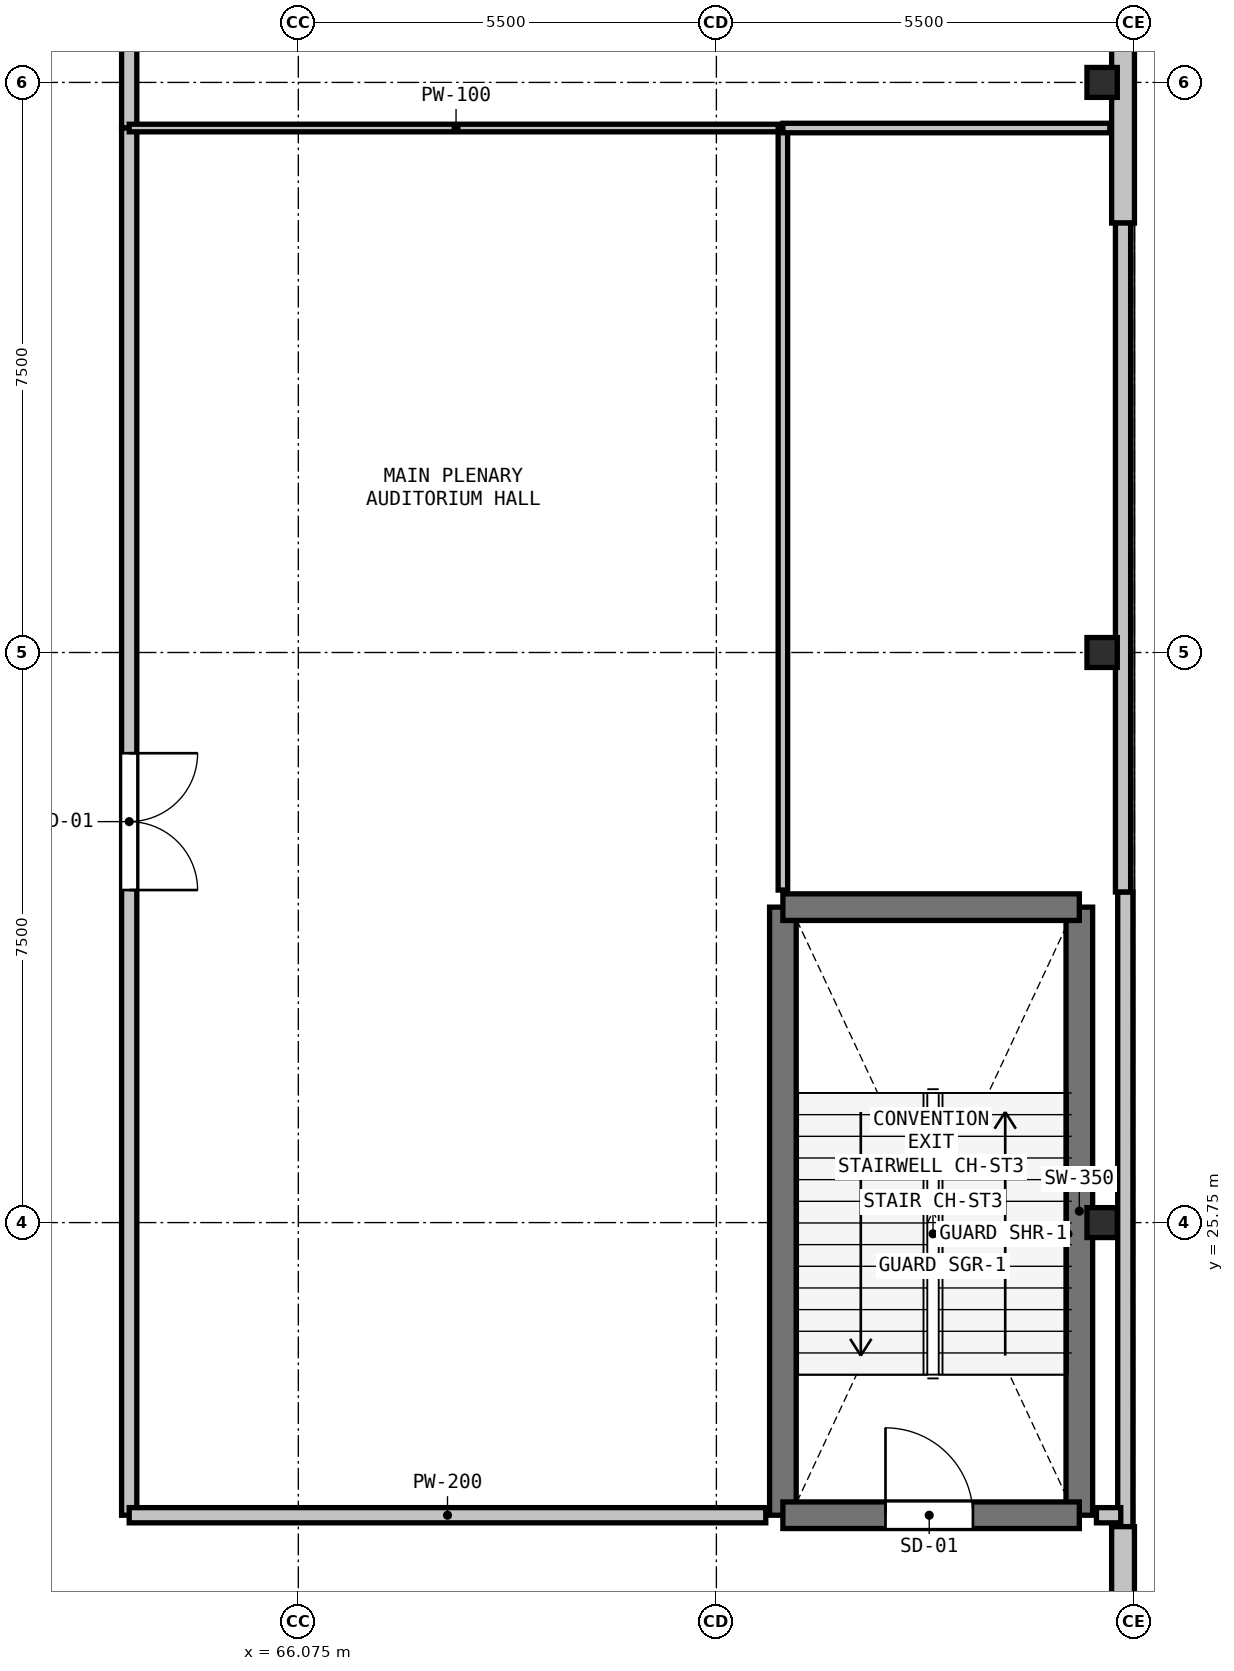
"""IFC4 building model, lengths in metres.
Left out: names, types, materials, properties, quantities, classifications, styles, units other than length and angle.
Written with IfcOpenShell. Run it as: python <this file> out.ifc"""

import sys

from ifc_helpers import new_model, si_unit, direction, frame, frame_2d, origin, origin_2d, place, context, subcontext, project, spatial, rectangle, i_section, extrude, element, fill, save


model = new_model("IFC4")
c1 = context("Model", 3, precision=1e-05, world=origin(), true_north=direction((0.0, 1.0)))
c2 = subcontext(c1, "Body", "Model", "MODEL_VIEW")
j1 = project(units=[si_unit("LENGTHUNIT", "METRE"), si_unit("PLANEANGLEUNIT", "RADIAN")], contexts=[c1])
p1 = place(None, origin())
s1 = spatial("IfcSite", under=j1, at=p1, CompositionType="ELEMENT")
p2 = place(p1, origin())
s2 = spatial("IfcBuilding", under=s1, at=p2, CompositionType="ELEMENT")
p3 = place(p2, frame((0.0, 0.0, 9.6)))
s3 = spatial("IfcBuildingStorey", under=s2, at=p3, CompositionType="ELEMENT", Elevation=9.6)
for number, where, z_axis, x_axis in (
    (1, (76.65, 25.75, 0.0), (0.0, 0.0, 1.0), (1.0, 0.0, 0.0)),
    (2, (76.65, 33.25, 0.0), (0.0, 0.0, 1.0), (1.0, 0.0, 0.0)),
    (3, (76.65, 40.75, 0.0), (0.0, 0.0, 1.0), (1.0, 0.0, 0.0)),
):
    element("IfcColumn", number, at=place(p3, frame(where, z_axis=z_axis, x_axis=x_axis)), inside=s3, PredefinedType="COLUMN", context=c2, shape_type="SweptSolid", body=[
        extrude(i_section(OverallWidth=0.399, OverallDepth=0.394, WebThickness=0.023, FlangeThickness=0.037, at=origin_2d()), origin(), (0.0, 0.0, 1.0), 4.8),
    ])
p4 = place(p3, frame((76.955, 30.1, 0.0), z_axis=(0.0, 0.0, 1.0), x_axis=(0.0, -1.0, 0.0)))
e4 = element("IfcWall", 4, at=p4, inside=s3, PredefinedType="PARAPET", context=c2, shape_type="SweptSolid", body=[
    extrude(rectangle(XDim=8.35, YDim=0.2, at=frame_2d((4.175, 0.0))), origin(), (0.0, 0.0, 1.0), 4.09),
])
p5 = place(p3, frame((76.925, 48.25, 0.0), z_axis=(0.0, 0.0, 1.0), x_axis=(0.0, -1.0, 0.0)))
e5 = element("IfcWall", 5, at=p5, inside=s3, PredefinedType="SOLIDWALL", context=c2, shape_type="SweptSolid", body=[
    extrude(rectangle(XDim=9.35, YDim=0.3, at=frame_2d((4.675, 0.0))), origin(), (0.0, 0.0, 1.0), 4.09),
])
p6 = place(p5, frame((2.2, 0.0, 0.9)))
e6 = element("IfcOpeningElement", 6, at=p6, cuts=e5, PredefinedType="OPENING", context=c2, shape_type="SweptSolid", body=[
    extrude(rectangle(XDim=2.8, YDim=2.4, at=frame_2d((1.4, 1.2))), frame((0.0, 0.16, 0.0), z_axis=(0.0, -1.0, 0.0), x_axis=(1.0, 0.0, 0.0)), (0.0, 0.0, 1.0), 0.32),
])
p7 = place(p3, frame((76.925, 21.75, 0.0), z_axis=(0.0, 0.0, 1.0), x_axis=(0.0, -1.0, 0.0)))
e7 = element("IfcWall", 7, at=p7, inside=s3, PredefinedType="SOLIDWALL", context=c2, shape_type="SweptSolid", body=[
    extrude(rectangle(XDim=18.5, YDim=0.3, at=frame_2d((9.25, 0.0))), origin(), (0.0, 0.0, 1.0), 4.09),
])
p8 = place(p3, frame((76.925, 38.9, 0.0), z_axis=(0.0, 0.0, 1.0), x_axis=(0.0, -1.0, 0.0)))
e8 = element("IfcWall", 8, at=p8, inside=s3, PredefinedType="PARAPET", context=c2, shape_type="SweptSolid", body=[
    extrude(rectangle(XDim=8.8, YDim=0.2, at=frame_2d((4.4, 0.0))), origin(), (0.0, 0.0, 1.0), 0.2),
])
for number, where, z_axis, x_axis in (
    (9, (76.35, 29.9, 0.0), (0.0, 0.0, 1.0), (0.0, -1.0, 0.0)),
    (10, (72.45, 21.9, 0.0), (0.0, 0.0, 1.0), (0.0, 1.0, 0.0)),
):
    element("IfcWall", number, at=place(p3, frame(where, z_axis=z_axis, x_axis=x_axis)), inside=s3, PredefinedType="SHEAR", context=c2, shape_type="SweptSolid", body=[
        extrude(rectangle(XDim=8.0, YDim=0.35, at=frame_2d((4.0, 0.0))), origin(), (0.0, 0.0, 1.0), 4.48),
    ])
p9 = place(p3, frame((72.45, 29.9, 0.0), z_axis=(0.0, 0.0, 1.0), x_axis=(1.0, 0.0, 0.0)))
e11 = element("IfcWall", 11, at=p9, inside=s3, PredefinedType="SHEAR", context=c2, shape_type="SweptSolid", body=[
    extrude(rectangle(XDim=3.9, YDim=0.35, at=frame_2d((1.95, 0.0))), origin(), (0.0, 0.0, 1.0), 4.48),
])
p10 = place(p3, frame((72.45, 21.9, 0.0), z_axis=(0.0, 0.0, 1.0), x_axis=(1.0, 0.0, 0.0)))
e12 = element("IfcWall", 12, at=p10, inside=s3, PredefinedType="SHEAR", context=c2, shape_type="SweptSolid", body=[
    extrude(rectangle(XDim=3.9, YDim=0.35, at=frame_2d((1.95, 0.0))), origin(), (0.0, 0.0, 1.0), 4.48),
])
p11 = place(p10, frame((1.35, 0.0, 0.0)))
e13 = element("IfcOpeningElement", 13, at=p11, cuts=e12, PredefinedType="OPENING", context=c2, shape_type="SweptSolid", body=[
    extrude(rectangle(XDim=1.15, YDim=2.15, at=frame_2d((0.575, 1.075))), frame((0.0, 0.185, 0.0), z_axis=(0.0, -1.0, 0.0), x_axis=(1.0, 0.0, 0.0)), (0.0, 0.0, 1.0), 0.37),
])
p12 = place(p3, frame((63.85, 45.4, 0.0), z_axis=(0.0, 0.0, 1.0), x_axis=(0.0, -1.0, 0.0)))
e14 = element("IfcWall", 14, at=p12, inside=s3, PredefinedType="PARTITIONING", context=c2, shape_type="SweptSolid", body=[
    extrude(rectangle(XDim=5.25, YDim=0.2, at=frame_2d((2.625, 0.0))), origin(), (0.0, 0.0, 1.0), 3.614),
])
p13 = place(p12, frame((1.725, 0.0, 0.0)))
e15 = element("IfcOpeningElement", 15, at=p13, cuts=e14, PredefinedType="OPENING", context=c2, shape_type="SweptSolid", body=[
    extrude(rectangle(XDim=1.8, YDim=2.2, at=frame_2d((0.9, 1.1))), frame((0.0, 0.11, 0.0), z_axis=(0.0, -1.0, 0.0), x_axis=(1.0, 0.0, 0.0)), (0.0, 0.0, 1.0), 0.22),
])
p14 = place(p3, frame((63.85, 40.15, 0.0), z_axis=(0.0, 0.0, 1.0), x_axis=(0.0, -1.0, 0.0)))
e16 = element("IfcWall", 16, at=p14, inside=s3, PredefinedType="PARTITIONING", context=c2, shape_type="SweptSolid", body=[
    extrude(rectangle(XDim=18.25, YDim=0.2, at=frame_2d((9.125, 0.0))), origin(), (0.0, 0.0, 1.0), 3.614),
])
p15 = place(p14, frame((8.225, 0.0, 0.0)))
e17 = element("IfcOpeningElement", 17, at=p15, cuts=e16, PredefinedType="OPENING", context=c2, shape_type="SweptSolid", body=[
    extrude(rectangle(XDim=1.8, YDim=2.2, at=frame_2d((0.9, 1.1))), frame((0.0, 0.11, 0.0), z_axis=(0.0, -1.0, 0.0), x_axis=(1.0, 0.0, 0.0)), (0.0, 0.0, 1.0), 0.22),
])
p16 = place(p3, frame((63.85, 21.9, 0.0), z_axis=(0.0, 0.0, 1.0), x_axis=(1.0, 0.0, 0.0)))
e18 = element("IfcWall", 18, at=p16, inside=s3, PredefinedType="PARTITIONING", context=c2, shape_type="SweptSolid", body=[
    extrude(rectangle(XDim=8.375, YDim=0.2, at=frame_2d((4.188, 0.0))), origin(), (0.0, 0.0, 1.0), 4.055),
])
p17 = place(p3, frame((76.575, 21.9, 0.0), z_axis=(0.0, 0.0, 1.0), x_axis=(1.0, 0.0, 0.0)))
e19 = element("IfcWall", 19, at=p17, inside=s3, PredefinedType="PARTITIONING", context=c2, shape_type="SweptSolid", body=[
    extrude(rectangle(XDim=0.32, YDim=0.2, at=frame_2d((0.16, 0.0))), origin(), (0.0, 0.0, 1.0), 4.09),
])
p18 = place(p3, frame((63.85, 40.15, 0.0), z_axis=(0.0, 0.0, 1.0), x_axis=(1.0, 0.0, 0.0)))
e20 = element("IfcWall", 20, at=p18, inside=s3, PredefinedType="PARTITIONING", context=c2, shape_type="SweptSolid", body=[
    extrude(rectangle(XDim=8.6, YDim=0.1, at=frame_2d((4.3, 0.0))), origin(), (0.0, 0.0, 1.0), 4.055),
])
p19 = place(p3, frame((72.45, 40.15, 0.0), z_axis=(0.0, 0.0, 1.0), x_axis=(0.0, -1.0, 0.0)))
e21 = element("IfcWall", 21, at=p19, inside=s3, PredefinedType="PARTITIONING", context=c2, shape_type="SweptSolid", body=[
    extrude(rectangle(XDim=10.025, YDim=0.125, at=frame_2d((5.012, 0.0))), origin(), (0.0, 0.0, 1.0), 3.614),
])
p20 = place(p3, frame((76.751, 40.15, 0.0), z_axis=(0.0, 0.0, 1.0), x_axis=(-1.0, 0.0, 0.0)))
e22 = element("IfcWall", 22, at=p20, inside=s3, PredefinedType="PARTITIONING", context=c2, shape_type="SweptSolid", body=[
    extrude(rectangle(XDim=4.301, YDim=0.125, at=frame_2d((2.15, 0.0))), origin(), (0.0, 0.0, 1.0), 4.09),
])
p21 = place(p11, origin())
e23 = element("IfcDoor", 23, at=p21, inside=s3, OperationType="SINGLE_SWING_LEFT", PredefinedType="DOOR", context=c2, shape_type="SweptSolid", body=[
    extrude(rectangle(XDim=1.15, YDim=2.15, at=frame_2d((0.575, 1.075))), frame((0.0, 0.025, 0.0), z_axis=(0.0, -1.0, 0.0), x_axis=(1.0, 0.0, 0.0)), (0.0, 0.0, 1.0), 0.05),
])
fill(e13, e23)
p22 = place(p15, origin())
e24 = element("IfcDoor", 24, at=p22, inside=s3, OperationType="DOUBLE_DOOR_SINGLE_SWING", PredefinedType="DOOR", context=c2, shape_type="SweptSolid", body=[
    extrude(rectangle(XDim=1.8, YDim=2.2, at=frame_2d((0.9, 1.1))), frame((0.0, 0.025, 0.0), z_axis=(0.0, -1.0, 0.0), x_axis=(1.0, 0.0, 0.0)), (0.0, 0.0, 1.0), 0.05),
])
fill(e17, e24)
save(model, sys.argv[1])
